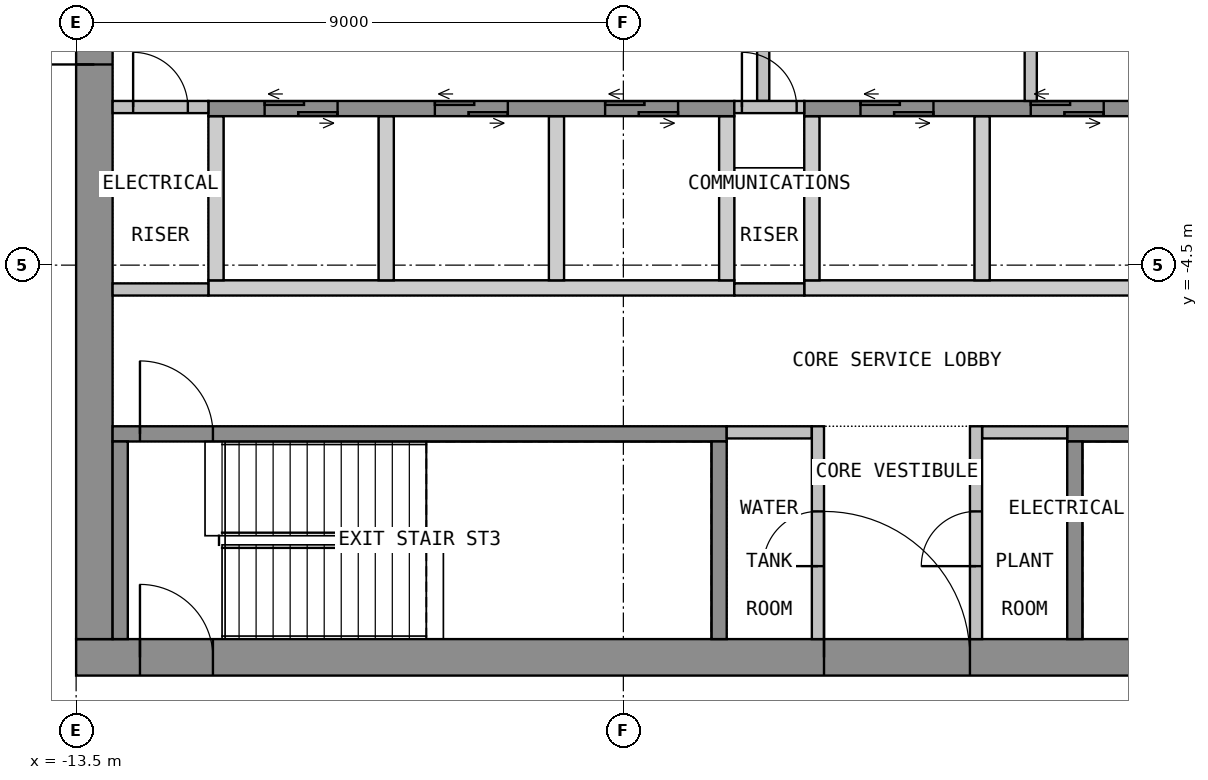
"""IFC4 building model, lengths in metres.
Left out: names, types, materials, properties, quantities, classifications, styles, units other than length and angle.
Written with IfcOpenShell. Run it as: python <this file> out.ifc"""

import sys

from ifc_helpers import new_model, si_unit, direction, frame, frame_2d, origin, place, context, subcontext, project, spatial, polyline, rectangle, outline, extrude, element, fill, save


model = new_model("IFC4")
c1 = context("Model", 3, precision=1e-05, world=origin(), true_north=direction((0.0, 1.0)))
c2 = subcontext(c1, "Body", "Model", "MODEL_VIEW")
j1 = project(units=[si_unit("LENGTHUNIT", "METRE"), si_unit("PLANEANGLEUNIT", "RADIAN")], contexts=[c1])
p1 = place(None, origin())
s1 = spatial("IfcSite", under=j1, at=p1, CompositionType="ELEMENT")
p2 = place(p1, origin())
s2 = spatial("IfcBuilding", under=s1, at=p2, CompositionType="ELEMENT")
p3 = place(p2, frame((0.0, 0.0, 282.0)))
s3 = spatial("IfcBuildingStorey", under=s2, at=p3, CompositionType="ELEMENT", Elevation=282.0)
p4 = place(p3, frame((-13.5, -10.95, 0.0), z_axis=(0.0, 0.0, 1.0), x_axis=(1.0, 0.0, 0.0)))
e1 = element("IfcWall", 1, at=p4, inside=s3, PredefinedType="SHEAR", context=c2, shape_type="SweptSolid", body=[
    extrude(rectangle(XDim=27.0, YDim=0.6, at=frame_2d((13.5, 0.0))), origin(), (0.0, 0.0, 1.0), 4.175),
])
p5 = place(p4, frame((12.3, 0.0, 0.0)))
e2 = element("IfcOpeningElement", 2, at=p5, cuts=e1, PredefinedType="OPENING", context=c2, shape_type="SweptSolid", body=[
    extrude(rectangle(XDim=2.4, YDim=2.1, at=frame_2d((1.2, 1.05))), frame((0.0, 0.31, 0.0), z_axis=(0.0, -1.0, 0.0), x_axis=(1.0, 0.0, 0.0)), (0.0, 0.0, 1.0), 0.62),
])
p6 = place(p4, frame((1.05, 0.0, 0.0)))
e3 = element("IfcOpeningElement", 3, at=p6, cuts=e1, PredefinedType="OPENING", context=c2, shape_type="SweptSolid", body=[
    extrude(rectangle(XDim=1.2, YDim=2.1, at=frame_2d((0.6, 1.05))), frame((0.0, 0.31, 0.0), z_axis=(0.0, -1.0, 0.0), x_axis=(1.0, 0.0, 0.0)), (0.0, 0.0, 1.0), 0.62),
])
p7 = place(p4, frame((24.75, 0.0, 0.0)))
e4 = element("IfcOpeningElement", 4, at=p7, cuts=e1, PredefinedType="OPENING", context=c2, shape_type="SweptSolid", body=[
    extrude(rectangle(XDim=1.2, YDim=2.1, at=frame_2d((0.6, 1.05))), frame((0.0, 0.31, 0.0), z_axis=(0.0, -1.0, 0.0), x_axis=(1.0, 0.0, 0.0)), (0.0, 0.0, 1.0), 0.62),
])
p8 = place(p3, frame((-13.2, -10.65, 0.0), z_axis=(0.0, 0.0, 1.0), x_axis=(0.0, 1.0, 0.0)))
e5 = element("IfcWall", 5, at=p8, inside=s3, PredefinedType="SHEAR", context=c2, shape_type="SweptSolid", body=[
    extrude(rectangle(XDim=21.3, YDim=0.6, at=frame_2d((10.65, 0.0))), origin(), (0.0, 0.0, 1.0), 4.175),
])
p9 = place(p8, frame((9.45, 0.0, 0.0)))
e6 = element("IfcOpeningElement", 6, at=p9, cuts=e5, PredefinedType="OPENING", context=c2, shape_type="SweptSolid", body=[
    extrude(rectangle(XDim=2.4, YDim=2.1, at=frame_2d((1.2, 1.05))), frame((0.0, 0.31, 0.0), z_axis=(0.0, -1.0, 0.0), x_axis=(1.0, 0.0, 0.0)), (0.0, 0.0, 1.0), 0.62),
])
p10 = place(p3, origin())
e7 = element("IfcWall", 7, at=p10, inside=s3, PredefinedType="SHEAR", context=c2, shape_type="SweptSolid", body=[
    extrude(outline(polyline([(-11.325, -5.0), (-2.675, -5.0), (-2.675, -4.75), (-11.325, -4.75), (-11.325, -5.0)])), origin(), (0.0, 0.0, 1.0), 4.175),
])
p11 = place(p3, origin())
e8 = element("IfcWall", 8, at=p11, inside=s3, PredefinedType="SHEAR", context=c2, shape_type="SweptSolid", body=[
    extrude(outline(polyline([(-1.525, -5.0), (4.325, -5.0), (4.325, -4.75), (-1.525, -4.75), (-1.525, -5.0)])), origin(), (0.0, 0.0, 1.0), 4.175),
])
p12 = place(p3, origin())
e9 = element("IfcWall", 9, at=p12, inside=s3, PredefinedType="SHEAR", context=c2, shape_type="SweptSolid", body=[
    extrude(outline(polyline([(-11.325, -4.75), (-11.075, -4.75), (-11.075, -2.05), (-11.325, -2.05), (-11.325, -4.75)])), origin(), (0.0, 0.0, 1.0), 4.175),
])
p13 = place(p3, origin())
e10 = element("IfcWall", 10, at=p13, inside=s3, PredefinedType="SHEAR", context=c2, shape_type="SweptSolid", body=[
    extrude(outline(polyline([(-8.525, -4.75), (-8.275, -4.75), (-8.275, -2.05), (-8.525, -2.05), (-8.525, -4.75)])), origin(), (0.0, 0.0, 1.0), 4.175),
])
p14 = place(p3, origin())
e11 = element("IfcWall", 11, at=p14, inside=s3, PredefinedType="SHEAR", context=c2, shape_type="SweptSolid", body=[
    extrude(outline(polyline([(-5.725, -4.75), (-5.475, -4.75), (-5.475, -2.05), (-5.725, -2.05), (-5.725, -4.75)])), origin(), (0.0, 0.0, 1.0), 4.175),
])
p15 = place(p3, origin())
e12 = element("IfcWall", 12, at=p15, inside=s3, PredefinedType="SHEAR", context=c2, shape_type="SweptSolid", body=[
    extrude(outline(polyline([(-2.925, -4.75), (-2.675, -4.75), (-2.675, -2.05), (-2.925, -2.05), (-2.925, -4.75)])), origin(), (0.0, 0.0, 1.0), 4.175),
])
p16 = place(p3, origin())
e13 = element("IfcWall", 13, at=p16, inside=s3, PredefinedType="SHEAR", context=c2, shape_type="SweptSolid", body=[
    extrude(outline(polyline([(-1.525, -4.75), (-1.275, -4.75), (-1.275, -2.05), (-1.525, -2.05), (-1.525, -4.75)])), origin(), (0.0, 0.0, 1.0), 4.175),
])
p17 = place(p3, origin())
e14 = element("IfcWall", 14, at=p17, inside=s3, PredefinedType="SHEAR", context=c2, shape_type="SweptSolid", body=[
    extrude(outline(polyline([(1.275, -4.75), (1.525, -4.75), (1.525, -2.05), (1.275, -2.05), (1.275, -4.75)])), origin(), (0.0, 0.0, 1.0), 4.175),
])
p18 = place(p3, frame((-11.325, -1.925, 0.0), z_axis=(0.0, 0.0, 1.0), x_axis=(1.0, 0.0, 0.0)))
e15 = element("IfcWall", 15, at=p18, inside=s3, PredefinedType="SHEAR", context=c2, shape_type="SweptSolid", body=[
    extrude(rectangle(XDim=8.65, YDim=0.25, at=frame_2d((4.325, 0.0))), origin(), (0.0, 0.0, 1.0), 4.175),
])
p19 = place(p18, frame((0.925, 0.0, 0.0)))
e16 = element("IfcOpeningElement", 16, at=p19, cuts=e15, PredefinedType="OPENING", context=c2, shape_type="SweptSolid", body=[
    extrude(rectangle(XDim=1.2, YDim=2.1, at=frame_2d((0.6, 1.05))), frame((0.0, 0.135, 0.0), z_axis=(0.0, -1.0, 0.0), x_axis=(1.0, 0.0, 0.0)), (0.0, 0.0, 1.0), 0.27),
])
p20 = place(p18, frame((3.725, 0.0, 0.0)))
e17 = element("IfcOpeningElement", 17, at=p20, cuts=e15, PredefinedType="OPENING", context=c2, shape_type="SweptSolid", body=[
    extrude(rectangle(XDim=1.2, YDim=2.1, at=frame_2d((0.6, 1.05))), frame((0.0, 0.135, 0.0), z_axis=(0.0, -1.0, 0.0), x_axis=(1.0, 0.0, 0.0)), (0.0, 0.0, 1.0), 0.27),
])
p21 = place(p18, frame((6.525, 0.0, 0.0)))
e18 = element("IfcOpeningElement", 18, at=p21, cuts=e15, PredefinedType="OPENING", context=c2, shape_type="SweptSolid", body=[
    extrude(rectangle(XDim=1.2, YDim=2.1, at=frame_2d((0.6, 1.05))), frame((0.0, 0.135, 0.0), z_axis=(0.0, -1.0, 0.0), x_axis=(1.0, 0.0, 0.0)), (0.0, 0.0, 1.0), 0.27),
])
p22 = place(p3, frame((-1.525, -1.925, 0.0), z_axis=(0.0, 0.0, 1.0), x_axis=(1.0, 0.0, 0.0)))
e19 = element("IfcWall", 19, at=p22, inside=s3, PredefinedType="SHEAR", context=c2, shape_type="SweptSolid", body=[
    extrude(rectangle(XDim=5.85, YDim=0.25, at=frame_2d((2.925, 0.0))), origin(), (0.0, 0.0, 1.0), 4.175),
])
p23 = place(p22, frame((0.925, 0.0, 0.0)))
e20 = element("IfcOpeningElement", 20, at=p23, cuts=e19, PredefinedType="OPENING", context=c2, shape_type="SweptSolid", body=[
    extrude(rectangle(XDim=1.2, YDim=2.1, at=frame_2d((0.6, 1.05))), frame((0.0, 0.135, 0.0), z_axis=(0.0, -1.0, 0.0), x_axis=(1.0, 0.0, 0.0)), (0.0, 0.0, 1.0), 0.27),
])
p24 = place(p22, frame((3.725, 0.0, 0.0)))
e21 = element("IfcOpeningElement", 21, at=p24, cuts=e19, PredefinedType="OPENING", context=c2, shape_type="SweptSolid", body=[
    extrude(rectangle(XDim=1.2, YDim=2.1, at=frame_2d((0.6, 1.05))), frame((0.0, 0.135, 0.0), z_axis=(0.0, -1.0, 0.0), x_axis=(1.0, 0.0, 0.0)), (0.0, 0.0, 1.0), 0.27),
])
p25 = place(p3, frame((-2.2, -1.8, 0.0), z_axis=(0.0, 0.0, 1.0), x_axis=(0.0, 1.0, 0.0)))
e22 = element("IfcWall", 22, at=p25, inside=s3, PredefinedType="PARTITIONING", context=c2, shape_type="SweptSolid", body=[
    extrude(rectangle(XDim=3.6, YDim=0.2, at=frame_2d((1.8, 0.0))), origin(), (0.0, 0.0, 1.0), 4.175),
])
p26 = place(p25, frame((1.2, 0.0, 0.0)))
e23 = element("IfcOpeningElement", 23, at=p26, cuts=e22, PredefinedType="OPENING", context=c2, shape_type="SweptSolid", body=[
    extrude(rectangle(XDim=1.2, YDim=2.1, at=frame_2d((0.6, 1.05))), frame((0.0, 0.11, 0.0), z_axis=(0.0, -1.0, 0.0), x_axis=(1.0, 0.0, 0.0)), (0.0, 0.0, 1.0), 0.22),
])
p27 = place(p3, frame((2.2, -1.8, 0.0), z_axis=(0.0, 0.0, 1.0), x_axis=(0.0, 1.0, 0.0)))
e24 = element("IfcWall", 24, at=p27, inside=s3, PredefinedType="PARTITIONING", context=c2, shape_type="SweptSolid", body=[
    extrude(rectangle(XDim=3.6, YDim=0.2, at=frame_2d((1.8, 0.0))), origin(), (0.0, 0.0, 1.0), 4.175),
])
p28 = place(p27, frame((1.2, 0.0, 0.0)))
e25 = element("IfcOpeningElement", 25, at=p28, cuts=e24, PredefinedType="OPENING", context=c2, shape_type="SweptSolid", body=[
    extrude(rectangle(XDim=1.2, YDim=2.1, at=frame_2d((0.6, 1.05))), frame((0.0, 0.11, 0.0), z_axis=(0.0, -1.0, 0.0), x_axis=(1.0, 0.0, 0.0)), (0.0, 0.0, 1.0), 0.22),
])
p29 = place(p3, frame((-12.9, -7.275, 0.0), z_axis=(0.0, 0.0, 1.0), x_axis=(1.0, 0.0, 0.0)))
e26 = element("IfcWall", 26, at=p29, inside=s3, PredefinedType="SHEAR", context=c2, shape_type="SweptSolid", body=[
    extrude(rectangle(XDim=10.1, YDim=0.25, at=frame_2d((5.05, 0.0))), origin(), (0.0, 0.0, 1.0), 4.175),
])
p30 = place(p29, frame((0.45, 0.0, 0.0)))
e27 = element("IfcOpeningElement", 27, at=p30, cuts=e26, PredefinedType="OPENING", context=c2, shape_type="SweptSolid", body=[
    extrude(rectangle(XDim=1.2, YDim=2.1, at=frame_2d((0.6, 1.05))), frame((0.0, 0.135, 0.0), z_axis=(0.0, -1.0, 0.0), x_axis=(1.0, 0.0, 0.0)), (0.0, 0.0, 1.0), 0.27),
])
for number, where, z_axis, x_axis in (
    (28, (-12.775, -10.65, 0.0), (0.0, 0.0, 1.0), (0.0, 1.0, 0.0)),
    (29, (-2.925, -10.65, 0.0), (0.0, 0.0, 1.0), (0.0, 1.0, 0.0)),
):
    element("IfcWall", number, at=place(p3, frame(where, z_axis=z_axis, x_axis=x_axis)), inside=s3, PredefinedType="SHEAR", context=c2, shape_type="SweptSolid", body=[
        extrude(rectangle(XDim=3.25, YDim=0.25, at=frame_2d((1.625, 0.0))), origin(), (0.0, 0.0, 1.0), 4.175),
    ])
p31 = place(p3, frame((2.8, -7.275, 0.0), z_axis=(0.0, 0.0, 1.0), x_axis=(1.0, 0.0, 0.0)))
e30 = element("IfcWall", 30, at=p31, inside=s3, PredefinedType="SHEAR", context=c2, shape_type="SweptSolid", body=[
    extrude(rectangle(XDim=10.1, YDim=0.25, at=frame_2d((5.05, 0.0))), origin(), (0.0, 0.0, 1.0), 4.175),
])
p32 = place(p31, frame((8.45, 0.0, 0.0)))
e31 = element("IfcOpeningElement", 31, at=p32, cuts=e30, PredefinedType="OPENING", context=c2, shape_type="SweptSolid", body=[
    extrude(rectangle(XDim=1.2, YDim=2.1, at=frame_2d((0.6, 1.05))), frame((0.0, 0.135, 0.0), z_axis=(0.0, -1.0, 0.0), x_axis=(1.0, 0.0, 0.0)), (0.0, 0.0, 1.0), 0.27),
])
p33 = place(p3, frame((2.925, -10.65, 0.0), z_axis=(0.0, 0.0, 1.0), x_axis=(0.0, 1.0, 0.0)))
e32 = element("IfcWall", 32, at=p33, inside=s3, PredefinedType="SHEAR", context=c2, shape_type="SweptSolid", body=[
    extrude(rectangle(XDim=3.25, YDim=0.25, at=frame_2d((1.625, 0.0))), origin(), (0.0, 0.0, 1.0), 4.175),
])
for number, where, z_axis, x_axis in (
    (33, (-2.8, -7.25, 0.0), (0.0, 0.0, 1.0), (1.0, 0.0, 0.0)),
    (34, (1.4, -7.25, 0.0), (0.0, 0.0, 1.0), (1.0, 0.0, 0.0)),
):
    element("IfcWall", number, at=place(p3, frame(where, z_axis=z_axis, x_axis=x_axis)), inside=s3, PredefinedType="PARTITIONING", context=c2, shape_type="SweptSolid", body=[
        extrude(rectangle(XDim=1.4, YDim=0.2, at=frame_2d((0.7, 0.0))), origin(), (0.0, 0.0, 1.0), 4.175),
    ])
p34 = place(p3, frame((-1.3, -10.65, 0.0), z_axis=(0.0, 0.0, 1.0), x_axis=(0.0, 1.0, 0.0)))
e35 = element("IfcWall", 35, at=p34, inside=s3, PredefinedType="PARTITIONING", context=c2, shape_type="SweptSolid", body=[
    extrude(rectangle(XDim=3.5, YDim=0.2, at=frame_2d((1.75, 0.0))), origin(), (0.0, 0.0, 1.0), 4.175),
])
p35 = place(p34, frame((1.2, 0.0, 0.0)))
e36 = element("IfcOpeningElement", 36, at=p35, cuts=e35, PredefinedType="OPENING", context=c2, shape_type="SweptSolid", body=[
    extrude(rectangle(XDim=0.9, YDim=2.1, at=frame_2d((0.45, 1.05))), frame((0.0, 0.11, 0.0), z_axis=(0.0, -1.0, 0.0), x_axis=(1.0, 0.0, 0.0)), (0.0, 0.0, 1.0), 0.22),
])
p36 = place(p3, frame((1.3, -10.65, 0.0), z_axis=(0.0, 0.0, 1.0), x_axis=(0.0, 1.0, 0.0)))
e37 = element("IfcWall", 37, at=p36, inside=s3, PredefinedType="PARTITIONING", context=c2, shape_type="SweptSolid", body=[
    extrude(rectangle(XDim=3.5, YDim=0.2, at=frame_2d((1.75, 0.0))), origin(), (0.0, 0.0, 1.0), 4.175),
])
p37 = place(p36, frame((1.2, 0.0, 0.0)))
e38 = element("IfcOpeningElement", 38, at=p37, cuts=e37, PredefinedType="OPENING", context=c2, shape_type="SweptSolid", body=[
    extrude(rectangle(XDim=0.9, YDim=2.1, at=frame_2d((0.45, 1.05))), frame((0.0, 0.11, 0.0), z_axis=(0.0, -1.0, 0.0), x_axis=(1.0, 0.0, 0.0)), (0.0, 0.0, 1.0), 0.22),
])
p38 = place(p3, frame((-12.9, -1.9, 0.0), z_axis=(0.0, 0.0, 1.0), x_axis=(1.0, 0.0, 0.0)))
e39 = element("IfcWall", 39, at=p38, inside=s3, PredefinedType="PARTITIONING", context=c2, shape_type="SweptSolid", body=[
    extrude(rectangle(XDim=1.575, YDim=0.2, at=frame_2d((0.788, 0.0))), origin(), (0.0, 0.0, 1.0), 4.175),
])
p39 = place(p38, frame((0.337, 0.0, 0.0)))
e40 = element("IfcOpeningElement", 40, at=p39, cuts=e39, PredefinedType="OPENING", context=c2, shape_type="SweptSolid", body=[
    extrude(rectangle(XDim=0.9, YDim=2.1, at=frame_2d((0.45, 1.05))), frame((0.0, 0.11, 0.0), z_axis=(0.0, -1.0, 0.0), x_axis=(1.0, 0.0, 0.0)), (0.0, 0.0, 1.0), 0.22),
])
p40 = place(p3, frame((-12.9, -4.9, 0.0), z_axis=(0.0, 0.0, 1.0), x_axis=(1.0, 0.0, 0.0)))
e41 = element("IfcWall", 41, at=p40, inside=s3, PredefinedType="PARTITIONING", context=c2, shape_type="SweptSolid", body=[
    extrude(rectangle(XDim=1.575, YDim=0.2, at=frame_2d((0.788, 0.0))), origin(), (0.0, 0.0, 1.0), 4.175),
])
p41 = place(p3, frame((-2.675, -1.9, 0.0), z_axis=(0.0, 0.0, 1.0), x_axis=(1.0, 0.0, 0.0)))
e42 = element("IfcWall", 42, at=p41, inside=s3, PredefinedType="PARTITIONING", context=c2, shape_type="SweptSolid", body=[
    extrude(rectangle(XDim=1.15, YDim=0.2, at=frame_2d((0.575, 0.0))), origin(), (0.0, 0.0, 1.0), 4.175),
])
p42 = place(p41, frame((0.125, 0.0, 0.0)))
e43 = element("IfcOpeningElement", 43, at=p42, cuts=e42, PredefinedType="OPENING", context=c2, shape_type="SweptSolid", body=[
    extrude(rectangle(XDim=0.9, YDim=2.1, at=frame_2d((0.45, 1.05))), frame((0.0, 0.11, 0.0), z_axis=(0.0, -1.0, 0.0), x_axis=(1.0, 0.0, 0.0)), (0.0, 0.0, 1.0), 0.22),
])
p43 = place(p3, frame((-2.675, -4.9, 0.0), z_axis=(0.0, 0.0, 1.0), x_axis=(1.0, 0.0, 0.0)))
e44 = element("IfcWall", 44, at=p43, inside=s3, PredefinedType="PARTITIONING", context=c2, shape_type="SweptSolid", body=[
    extrude(rectangle(XDim=1.15, YDim=0.2, at=frame_2d((0.575, 0.0))), origin(), (0.0, 0.0, 1.0), 4.175),
])
p44 = place(p9, origin())
e45 = element("IfcDoor", 45, at=p44, inside=s3, OperationType="DOUBLE_DOOR_DOUBLE_SWING", PredefinedType="DOOR", context=c2, shape_type="SweptSolid", body=[
    extrude(rectangle(XDim=2.4, YDim=2.1, at=frame_2d((1.2, 1.05))), frame((0.0, 0.025, 0.0), z_axis=(0.0, -1.0, 0.0), x_axis=(1.0, 0.0, 0.0)), (0.0, 0.0, 1.0), 0.05),
])
fill(e6, e45)
p45 = place(p5, origin())
e46 = element("IfcDoor", 46, at=p45, inside=s3, OperationType="DOUBLE_DOOR_DOUBLE_SWING", PredefinedType="DOOR", context=c2, shape_type="SweptSolid", body=[
    extrude(rectangle(XDim=2.4, YDim=2.1, at=frame_2d((1.2, 1.05))), frame((0.0, 0.025, 0.0), z_axis=(0.0, -1.0, 0.0), x_axis=(1.0, 0.0, 0.0)), (0.0, 0.0, 1.0), 0.05),
])
fill(e2, e46)
p46 = place(p6, origin())
e47 = element("IfcDoor", 47, at=p46, inside=s3, OperationType="SINGLE_SWING_RIGHT", PredefinedType="DOOR", context=c2, shape_type="SweptSolid", body=[
    extrude(rectangle(XDim=1.2, YDim=2.1, at=frame_2d((0.6, 1.05))), frame((0.0, 0.025, 0.0), z_axis=(0.0, -1.0, 0.0), x_axis=(1.0, 0.0, 0.0)), (0.0, 0.0, 1.0), 0.05),
])
fill(e3, e47)
p47 = place(p19, origin())
e48 = element("IfcDoor", 48, at=p47, inside=s3, OperationType="DOUBLE_DOOR_SLIDING", PredefinedType="DOOR", context=c2, shape_type="SweptSolid", body=[
    extrude(rectangle(XDim=1.2, YDim=2.1, at=frame_2d((0.6, 1.05))), frame((0.0, 0.025, 0.0), z_axis=(0.0, -1.0, 0.0), x_axis=(1.0, 0.0, 0.0)), (0.0, 0.0, 1.0), 0.05),
])
fill(e16, e48)
p48 = place(p20, origin())
e49 = element("IfcDoor", 49, at=p48, inside=s3, OperationType="DOUBLE_DOOR_SLIDING", PredefinedType="DOOR", context=c2, shape_type="SweptSolid", body=[
    extrude(rectangle(XDim=1.2, YDim=2.1, at=frame_2d((0.6, 1.05))), frame((0.0, 0.025, 0.0), z_axis=(0.0, -1.0, 0.0), x_axis=(1.0, 0.0, 0.0)), (0.0, 0.0, 1.0), 0.05),
])
fill(e17, e49)
p49 = place(p21, origin())
e50 = element("IfcDoor", 50, at=p49, inside=s3, OperationType="DOUBLE_DOOR_SLIDING", PredefinedType="DOOR", context=c2, shape_type="SweptSolid", body=[
    extrude(rectangle(XDim=1.2, YDim=2.1, at=frame_2d((0.6, 1.05))), frame((0.0, 0.025, 0.0), z_axis=(0.0, -1.0, 0.0), x_axis=(1.0, 0.0, 0.0)), (0.0, 0.0, 1.0), 0.05),
])
fill(e18, e50)
p50 = place(p23, origin())
e51 = element("IfcDoor", 51, at=p50, inside=s3, OperationType="DOUBLE_DOOR_SLIDING", PredefinedType="DOOR", context=c2, shape_type="SweptSolid", body=[
    extrude(rectangle(XDim=1.2, YDim=2.1, at=frame_2d((0.6, 1.05))), frame((0.0, 0.025, 0.0), z_axis=(0.0, -1.0, 0.0), x_axis=(1.0, 0.0, 0.0)), (0.0, 0.0, 1.0), 0.05),
])
fill(e20, e51)
p51 = place(p24, origin())
e52 = element("IfcDoor", 52, at=p51, inside=s3, OperationType="DOUBLE_DOOR_SLIDING", PredefinedType="DOOR", context=c2, shape_type="SweptSolid", body=[
    extrude(rectangle(XDim=1.2, YDim=2.1, at=frame_2d((0.6, 1.05))), frame((0.0, 0.025, 0.0), z_axis=(0.0, -1.0, 0.0), x_axis=(1.0, 0.0, 0.0)), (0.0, 0.0, 1.0), 0.05),
])
fill(e21, e52)
p52 = place(p30, origin())
e53 = element("IfcDoor", 53, at=p52, inside=s3, OperationType="SINGLE_SWING_LEFT", PredefinedType="DOOR", context=c2, shape_type="SweptSolid", body=[
    extrude(rectangle(XDim=1.2, YDim=2.1, at=frame_2d((0.6, 1.05))), frame((0.0, 0.025, 0.0), z_axis=(0.0, -1.0, 0.0), x_axis=(1.0, 0.0, 0.0)), (0.0, 0.0, 1.0), 0.05),
])
fill(e27, e53)
p53 = place(p35, origin())
e54 = element("IfcDoor", 54, at=p53, inside=s3, OperationType="SINGLE_SWING_LEFT", PredefinedType="DOOR", context=c2, shape_type="SweptSolid", body=[
    extrude(rectangle(XDim=0.9, YDim=2.1, at=frame_2d((0.45, 1.05))), frame((0.0, 0.025, 0.0), z_axis=(0.0, -1.0, 0.0), x_axis=(1.0, 0.0, 0.0)), (0.0, 0.0, 1.0), 0.05),
])
fill(e36, e54)
p54 = place(p37, origin())
e55 = element("IfcDoor", 55, at=p54, inside=s3, OperationType="SINGLE_SWING_LEFT", PredefinedType="DOOR", context=c2, shape_type="SweptSolid", body=[
    extrude(rectangle(XDim=0.9, YDim=2.1, at=frame_2d((0.45, 1.05))), frame((0.0, 0.025, 0.0), z_axis=(0.0, -1.0, 0.0), x_axis=(1.0, 0.0, 0.0)), (0.0, 0.0, 1.0), 0.05),
])
fill(e38, e55)
p55 = place(p39, origin())
e56 = element("IfcDoor", 56, at=p55, inside=s3, OperationType="SINGLE_SWING_LEFT", PredefinedType="DOOR", context=c2, shape_type="SweptSolid", body=[
    extrude(rectangle(XDim=0.9, YDim=2.1, at=frame_2d((0.45, 1.05))), frame((0.0, 0.025, 0.0), z_axis=(0.0, -1.0, 0.0), x_axis=(1.0, 0.0, 0.0)), (0.0, 0.0, 1.0), 0.05),
])
fill(e40, e56)
p56 = place(p42, origin())
e57 = element("IfcDoor", 57, at=p56, inside=s3, OperationType="SINGLE_SWING_LEFT", PredefinedType="DOOR", context=c2, shape_type="SweptSolid", body=[
    extrude(rectangle(XDim=0.9, YDim=2.1, at=frame_2d((0.45, 1.05))), frame((0.0, 0.025, 0.0), z_axis=(0.0, -1.0, 0.0), x_axis=(1.0, 0.0, 0.0)), (0.0, 0.0, 1.0), 0.05),
])
fill(e43, e57)
save(model, sys.argv[1])
